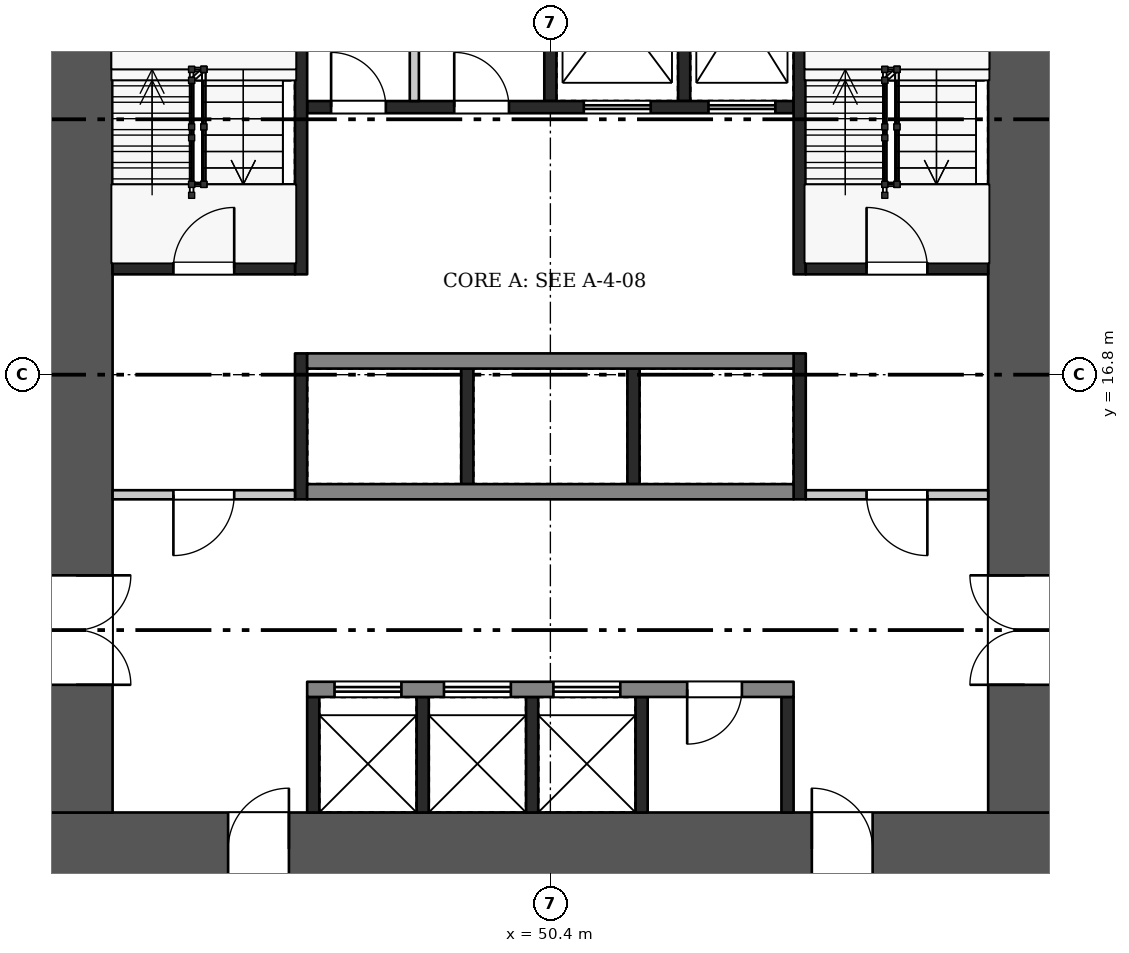
"""IFC4 building model, lengths in metres.
Left out: names, types, materials, properties, quantities, classifications, styles, units other than length and angle.
Written with IfcOpenShell. Run it as: python <this file> out.ifc"""

import sys

from ifc_helpers import new_model, si_unit, direction, frame, frame_2d, origin, place, context, subcontext, project, spatial, rectangle, extrude, element, fill, save


model = new_model("IFC4")
c1 = context("Model", 3, precision=1e-05, world=origin(), true_north=direction((0.0, 1.0)))
c2 = subcontext(c1, "Body", "Model", "MODEL_VIEW")
j1 = project(units=[si_unit("LENGTHUNIT", "METRE"), si_unit("PLANEANGLEUNIT", "RADIAN")], contexts=[c1])
p1 = place(None, origin())
s1 = spatial("IfcSite", under=j1, at=p1, CompositionType="ELEMENT")
p2 = place(p1, origin())
s2 = spatial("IfcBuilding", under=s1, at=p2, CompositionType="ELEMENT")
p3 = place(p2, frame((0.0, 0.0, 19.8)))
s3 = spatial("IfcBuildingStorey", under=s2, at=p3, CompositionType="ELEMENT", Elevation=19.8)
p4 = place(p3, frame((42.0, 9.0, 0.0), z_axis=(0.0, 0.0, 1.0), x_axis=(1.0, 0.0, 0.0)))
e1 = element("IfcWall", 1, at=p4, inside=s3, PredefinedType="SHEAR", context=c2, shape_type="SweptSolid", body=[
    extrude(rectangle(XDim=16.8, YDim=1.2, at=frame_2d((8.4, 0.0))), origin(), (0.0, 0.0, 1.0), 5.12),
])
p5 = place(p4, frame((3.1, 0.0, 0.0)))
e2 = element("IfcOpeningElement", 2, at=p5, cuts=e1, PredefinedType="OPENING", context=c2, shape_type="SweptSolid", body=[
    extrude(rectangle(XDim=1.0, YDim=2.1, at=frame_2d((0.5, 1.05))), frame((0.0, 0.61, 0.0), z_axis=(0.0, -1.0, 0.0), x_axis=(1.0, 0.0, 0.0)), (0.0, 0.0, 1.0), 1.22),
])
p6 = place(p4, frame((12.7, 0.0, 0.0)))
e3 = element("IfcOpeningElement", 3, at=p6, cuts=e1, PredefinedType="OPENING", context=c2, shape_type="SweptSolid", body=[
    extrude(rectangle(XDim=1.0, YDim=2.1, at=frame_2d((0.5, 1.05))), frame((0.0, 0.61, 0.0), z_axis=(0.0, -1.0, 0.0), x_axis=(1.0, 0.0, 0.0)), (0.0, 0.0, 1.0), 1.22),
])
p7 = place(p3, frame((42.6, 9.6, 0.0), z_axis=(0.0, 0.0, 1.0), x_axis=(0.0, 1.0, 0.0)))
e4 = element("IfcWall", 4, at=p7, inside=s3, PredefinedType="SHEAR", context=c2, shape_type="SweptSolid", body=[
    extrude(rectangle(XDim=14.4, YDim=1.2, at=frame_2d((7.2, 0.0))), origin(), (0.0, 0.0, 1.0), 5.12),
])
p8 = place(p7, frame((2.1, 0.0, 0.0)))
e5 = element("IfcOpeningElement", 5, at=p8, cuts=e4, PredefinedType="OPENING", context=c2, shape_type="SweptSolid", body=[
    extrude(rectangle(XDim=1.8, YDim=2.1, at=frame_2d((0.9, 1.05))), frame((0.0, 0.61, 0.0), z_axis=(0.0, -1.0, 0.0), x_axis=(1.0, 0.0, 0.0)), (0.0, 0.0, 1.0), 1.22),
])
p9 = place(p3, frame((58.2, 9.6, 0.0), z_axis=(0.0, 0.0, 1.0), x_axis=(0.0, 1.0, 0.0)))
e6 = element("IfcWall", 6, at=p9, inside=s3, PredefinedType="SHEAR", context=c2, shape_type="SweptSolid", body=[
    extrude(rectangle(XDim=14.4, YDim=1.2, at=frame_2d((7.2, 0.0))), origin(), (0.0, 0.0, 1.0), 5.12),
])
p10 = place(p9, frame((2.1, 0.0, 0.0)))
e7 = element("IfcOpeningElement", 7, at=p10, cuts=e6, PredefinedType="OPENING", context=c2, shape_type="SweptSolid", body=[
    extrude(rectangle(XDim=1.8, YDim=2.1, at=frame_2d((0.9, 1.05))), frame((0.0, 0.61, 0.0), z_axis=(0.0, -1.0, 0.0), x_axis=(1.0, 0.0, 0.0)), (0.0, 0.0, 1.0), 1.22),
])
for number, where, z_axis, x_axis in (
    (8, (46.5, 9.6, 0.0), (0.0, 0.0, 1.0), (0.0, 1.0, 0.0)),
    (9, (48.3, 9.6, 0.0), (0.0, 0.0, 1.0), (0.0, 1.0, 0.0)),
    (10, (50.1, 9.6, 0.0), (0.0, 0.0, 1.0), (0.0, 1.0, 0.0)),
    (11, (51.9, 9.6, 0.0), (0.0, 0.0, 1.0), (0.0, 1.0, 0.0)),
    (12, (54.3, 9.6, 0.0), (0.0, 0.0, 1.0), (0.0, 1.0, 0.0)),
):
    element("IfcWall", number, at=place(p3, frame(where, z_axis=z_axis, x_axis=x_axis)), inside=s3, PredefinedType="SHEAR", context=c2, shape_type="SweptSolid", body=[
        extrude(rectangle(XDim=1.9, YDim=0.2, at=frame_2d((0.95, 0.0))), origin(), (0.0, 0.0, 1.0), 5.12),
    ])
p11 = place(p3, frame((46.4, 11.625, 0.0), z_axis=(0.0, 0.0, 1.0), x_axis=(1.0, 0.0, 0.0)))
e13 = element("IfcWall", 13, at=p11, inside=s3, PredefinedType="SHEAR", context=c2, shape_type="SweptSolid", body=[
    extrude(rectangle(XDim=8.0, YDim=0.25, at=frame_2d((4.0, 0.0))), origin(), (0.0, 0.0, 1.0), 5.12),
])
p12 = place(p11, frame((0.45, 0.0, 0.0)))
e14 = element("IfcOpeningElement", 14, at=p12, cuts=e13, PredefinedType="OPENING", context=c2, shape_type="SweptSolid", body=[
    extrude(rectangle(XDim=1.1, YDim=2.1, at=frame_2d((0.55, 1.05))), frame((0.0, 0.135, 0.0), z_axis=(0.0, -1.0, 0.0), x_axis=(1.0, 0.0, 0.0)), (0.0, 0.0, 1.0), 0.27),
])
p13 = place(p11, frame((2.25, 0.0, 0.0)))
e15 = element("IfcOpeningElement", 15, at=p13, cuts=e13, PredefinedType="OPENING", context=c2, shape_type="SweptSolid", body=[
    extrude(rectangle(XDim=1.1, YDim=2.1, at=frame_2d((0.55, 1.05))), frame((0.0, 0.135, 0.0), z_axis=(0.0, -1.0, 0.0), x_axis=(1.0, 0.0, 0.0)), (0.0, 0.0, 1.0), 0.27),
])
p14 = place(p11, frame((4.05, 0.0, 0.0)))
e16 = element("IfcOpeningElement", 16, at=p14, cuts=e13, PredefinedType="OPENING", context=c2, shape_type="SweptSolid", body=[
    extrude(rectangle(XDim=1.1, YDim=2.1, at=frame_2d((0.55, 1.05))), frame((0.0, 0.135, 0.0), z_axis=(0.0, -1.0, 0.0), x_axis=(1.0, 0.0, 0.0)), (0.0, 0.0, 1.0), 0.27),
])
p15 = place(p11, frame((6.25, 0.0, 0.0)))
e17 = element("IfcOpeningElement", 17, at=p15, cuts=e13, PredefinedType="OPENING", context=c2, shape_type="SweptSolid", body=[
    extrude(rectangle(XDim=0.9, YDim=2.1, at=frame_2d((0.45, 1.05))), frame((0.0, 0.135, 0.0), z_axis=(0.0, -1.0, 0.0), x_axis=(1.0, 0.0, 0.0)), (0.0, 0.0, 1.0), 0.27),
])
for number, where, z_axis, x_axis in (
    (18, (49.033, 15.0, 0.0), (0.0, 0.0, 1.0), (0.0, 1.0, 0.0)),
    (19, (51.767, 15.0, 0.0), (0.0, 0.0, 1.0), (0.0, 1.0, 0.0)),
):
    element("IfcWall", number, at=place(p3, frame(where, z_axis=z_axis, x_axis=x_axis)), inside=s3, PredefinedType="SHEAR", context=c2, shape_type="SweptSolid", body=[
        extrude(rectangle(XDim=1.9, YDim=0.2, at=frame_2d((0.95, 0.0))), origin(), (0.0, 0.0, 1.0), 5.12),
    ])
for number, where, z_axis, x_axis in (
    (20, (46.4, 14.875, 0.0), (0.0, 0.0, 1.0), (1.0, 0.0, 0.0)),
    (21, (46.4, 17.025, 0.0), (0.0, 0.0, 1.0), (1.0, 0.0, 0.0)),
):
    element("IfcWall", number, at=place(p3, frame(where, z_axis=z_axis, x_axis=x_axis)), inside=s3, PredefinedType="SHEAR", context=c2, shape_type="SweptSolid", body=[
        extrude(rectangle(XDim=8.0, YDim=0.25, at=frame_2d((4.0, 0.0))), origin(), (0.0, 0.0, 1.0), 5.12),
    ])
for number, where, z_axis, x_axis in (
    (22, (50.4, 21.3, 0.0), (0.0, 0.0, 1.0), (0.0, 1.0, 0.0)),
    (23, (52.6, 21.3, 0.0), (0.0, 0.0, 1.0), (0.0, 1.0, 0.0)),
):
    element("IfcWall", number, at=place(p3, frame(where, z_axis=z_axis, x_axis=x_axis)), inside=s3, PredefinedType="SHEAR", context=c2, shape_type="SweptSolid", body=[
        extrude(rectangle(XDim=2.7, YDim=0.2, at=frame_2d((1.35, 0.0))), origin(), (0.0, 0.0, 1.0), 5.12),
    ])
p16 = place(p3, frame((48.163, 21.3, 0.0), z_axis=(0.0, 0.0, 1.0), x_axis=(0.0, 1.0, 0.0)))
e24 = element("IfcWall", 24, at=p16, inside=s3, PredefinedType="PARTITIONING", context=c2, shape_type="SweptSolid", body=[
    extrude(rectangle(XDim=2.7, YDim=0.15, at=frame_2d((1.35, 0.0))), origin(), (0.0, 0.0, 1.0), 5.12),
])
p17 = place(p3, frame((46.4, 21.2, 0.0), z_axis=(0.0, 0.0, 1.0), x_axis=(1.0, 0.0, 0.0)))
e25 = element("IfcWall", 25, at=p17, inside=s3, PredefinedType="SHEAR", context=c2, shape_type="SweptSolid", body=[
    extrude(rectangle(XDim=8.0, YDim=0.2, at=frame_2d((4.0, 0.0))), origin(), (0.0, 0.0, 1.0), 5.12),
])
p18 = place(p17, frame((0.394, 0.0, 0.0)))
e26 = element("IfcOpeningElement", 26, at=p18, cuts=e25, PredefinedType="OPENING", context=c2, shape_type="SweptSolid", body=[
    extrude(rectangle(XDim=0.9, YDim=2.1, at=frame_2d((0.45, 1.05))), frame((0.0, 0.11, 0.0), z_axis=(0.0, -1.0, 0.0), x_axis=(1.0, 0.0, 0.0)), (0.0, 0.0, 1.0), 0.22),
])
p19 = place(p17, frame((2.419, 0.0, 0.0)))
e27 = element("IfcOpeningElement", 27, at=p19, cuts=e25, PredefinedType="OPENING", context=c2, shape_type="SweptSolid", body=[
    extrude(rectangle(XDim=0.9, YDim=2.1, at=frame_2d((0.45, 1.05))), frame((0.0, 0.11, 0.0), z_axis=(0.0, -1.0, 0.0), x_axis=(1.0, 0.0, 0.0)), (0.0, 0.0, 1.0), 0.22),
])
p20 = place(p17, frame((4.55, 0.0, 0.0)))
e28 = element("IfcOpeningElement", 28, at=p20, cuts=e25, PredefinedType="OPENING", context=c2, shape_type="SweptSolid", body=[
    extrude(rectangle(XDim=1.1, YDim=2.1, at=frame_2d((0.55, 1.05))), frame((0.0, 0.11, 0.0), z_axis=(0.0, -1.0, 0.0), x_axis=(1.0, 0.0, 0.0)), (0.0, 0.0, 1.0), 0.22),
])
p21 = place(p17, frame((6.6, 0.0, 0.0)))
e29 = element("IfcOpeningElement", 29, at=p21, cuts=e25, PredefinedType="OPENING", context=c2, shape_type="SweptSolid", body=[
    extrude(rectangle(XDim=1.1, YDim=2.1, at=frame_2d((0.55, 1.05))), frame((0.0, 0.11, 0.0), z_axis=(0.0, -1.0, 0.0), x_axis=(1.0, 0.0, 0.0)), (0.0, 0.0, 1.0), 0.22),
])
p22 = place(p3, frame((46.3, 14.75, 0.0), z_axis=(0.0, 0.0, 1.0), x_axis=(0.0, 1.0, 0.0)))
e30 = element("IfcWall", 30, at=p22, inside=s3, PredefinedType="SHEAR", context=c2, shape_type="SweptSolid", body=[
    extrude(rectangle(XDim=2.4, YDim=0.2, at=frame_2d((1.2, 0.0))), origin(), (0.0, 0.0, 1.0), 5.12),
])
p23 = place(p3, frame((46.3, 18.45, 0.0), z_axis=(0.0, 0.0, 1.0), x_axis=(0.0, 1.0, 0.0)))
e31 = element("IfcWall", 31, at=p23, inside=s3, PredefinedType="SHEAR", context=c2, shape_type="SweptSolid", body=[
    extrude(rectangle(XDim=5.55, YDim=0.2, at=frame_2d((2.775, 0.0))), origin(), (0.0, 0.0, 1.0), 5.12),
])
p24 = place(p3, frame((43.2, 14.825, 0.0), z_axis=(0.0, 0.0, 1.0), x_axis=(1.0, 0.0, 0.0)))
e32 = element("IfcWall", 32, at=p24, inside=s3, PredefinedType="PARTITIONING", context=c2, shape_type="SweptSolid", body=[
    extrude(rectangle(XDim=3.0, YDim=0.15, at=frame_2d((1.5, 0.0))), origin(), (0.0, 0.0, 1.0), 5.12),
])
p25 = place(p24, frame((1.0, 0.0, 0.0)))
e33 = element("IfcOpeningElement", 33, at=p25, cuts=e32, PredefinedType="OPENING", context=c2, shape_type="SweptSolid", body=[
    extrude(rectangle(XDim=1.0, YDim=2.1, at=frame_2d((0.5, 1.05))), frame((0.0, 0.085, 0.0), z_axis=(0.0, -1.0, 0.0), x_axis=(1.0, 0.0, 0.0)), (0.0, 0.0, 1.0), 0.17),
])
p26 = place(p3, frame((43.2, 18.55, 0.0), z_axis=(0.0, 0.0, 1.0), x_axis=(1.0, 0.0, 0.0)))
e34 = element("IfcWall", 34, at=p26, inside=s3, PredefinedType="SHEAR", context=c2, shape_type="SweptSolid", body=[
    extrude(rectangle(XDim=3.0, YDim=0.2, at=frame_2d((1.5, 0.0))), origin(), (0.0, 0.0, 1.0), 5.12),
])
p27 = place(p26, frame((1.0, 0.0, 0.0)))
e35 = element("IfcOpeningElement", 35, at=p27, cuts=e34, PredefinedType="OPENING", context=c2, shape_type="SweptSolid", body=[
    extrude(rectangle(XDim=1.0, YDim=2.1, at=frame_2d((0.5, 1.05))), frame((0.0, 0.11, 0.0), z_axis=(0.0, -1.0, 0.0), x_axis=(1.0, 0.0, 0.0)), (0.0, 0.0, 1.0), 0.22),
])
p28 = place(p3, frame((54.5, 14.75, 0.0), z_axis=(0.0, 0.0, 1.0), x_axis=(0.0, 1.0, 0.0)))
e36 = element("IfcWall", 36, at=p28, inside=s3, PredefinedType="SHEAR", context=c2, shape_type="SweptSolid", body=[
    extrude(rectangle(XDim=2.4, YDim=0.2, at=frame_2d((1.2, 0.0))), origin(), (0.0, 0.0, 1.0), 5.12),
])
p29 = place(p3, frame((54.5, 18.45, 0.0), z_axis=(0.0, 0.0, 1.0), x_axis=(0.0, 1.0, 0.0)))
e37 = element("IfcWall", 37, at=p29, inside=s3, PredefinedType="SHEAR", context=c2, shape_type="SweptSolid", body=[
    extrude(rectangle(XDim=5.55, YDim=0.2, at=frame_2d((2.775, 0.0))), origin(), (0.0, 0.0, 1.0), 5.12),
])
p30 = place(p3, frame((54.6, 14.825, 0.0), z_axis=(0.0, 0.0, 1.0), x_axis=(1.0, 0.0, 0.0)))
e38 = element("IfcWall", 38, at=p30, inside=s3, PredefinedType="PARTITIONING", context=c2, shape_type="SweptSolid", body=[
    extrude(rectangle(XDim=3.0, YDim=0.15, at=frame_2d((1.5, 0.0))), origin(), (0.0, 0.0, 1.0), 5.12),
])
p31 = place(p30, frame((1.0, 0.0, 0.0)))
e39 = element("IfcOpeningElement", 39, at=p31, cuts=e38, PredefinedType="OPENING", context=c2, shape_type="SweptSolid", body=[
    extrude(rectangle(XDim=1.0, YDim=2.1, at=frame_2d((0.5, 1.05))), frame((0.0, 0.085, 0.0), z_axis=(0.0, -1.0, 0.0), x_axis=(1.0, 0.0, 0.0)), (0.0, 0.0, 1.0), 0.17),
])
p32 = place(p3, frame((54.6, 18.55, 0.0), z_axis=(0.0, 0.0, 1.0), x_axis=(1.0, 0.0, 0.0)))
e40 = element("IfcWall", 40, at=p32, inside=s3, PredefinedType="SHEAR", context=c2, shape_type="SweptSolid", body=[
    extrude(rectangle(XDim=3.0, YDim=0.2, at=frame_2d((1.5, 0.0))), origin(), (0.0, 0.0, 1.0), 5.12),
])
p33 = place(p32, frame((1.0, 0.0, 0.0)))
e41 = element("IfcOpeningElement", 41, at=p33, cuts=e40, PredefinedType="OPENING", context=c2, shape_type="SweptSolid", body=[
    extrude(rectangle(XDim=1.0, YDim=2.1, at=frame_2d((0.5, 1.05))), frame((0.0, 0.11, 0.0), z_axis=(0.0, -1.0, 0.0), x_axis=(1.0, 0.0, 0.0)), (0.0, 0.0, 1.0), 0.22),
])
p34 = place(p5, origin())
e42 = element("IfcDoor", 42, at=p34, inside=s3, OperationType="SINGLE_SWING_RIGHT", PredefinedType="DOOR", context=c2, shape_type="SweptSolid", body=[
    extrude(rectangle(XDim=1.0, YDim=2.1, at=frame_2d((0.5, 1.05))), frame((0.0, 0.025, 0.0), z_axis=(0.0, -1.0, 0.0), x_axis=(1.0, 0.0, 0.0)), (0.0, 0.0, 1.0), 0.05),
])
fill(e2, e42)
p35 = place(p6, origin())
e43 = element("IfcDoor", 43, at=p35, inside=s3, OperationType="SINGLE_SWING_LEFT", PredefinedType="DOOR", context=c2, shape_type="SweptSolid", body=[
    extrude(rectangle(XDim=1.0, YDim=2.1, at=frame_2d((0.5, 1.05))), frame((0.0, 0.025, 0.0), z_axis=(0.0, -1.0, 0.0), x_axis=(1.0, 0.0, 0.0)), (0.0, 0.0, 1.0), 0.05),
])
fill(e3, e43)
p36 = place(p8, frame((1.8, 0.0, 0.0), z_axis=(0.0, 0.0, 1.0), x_axis=(-1.0, 0.0, 0.0)))
e44 = element("IfcDoor", 44, at=p36, inside=s3, OperationType="DOUBLE_DOOR_SINGLE_SWING", PredefinedType="DOOR", context=c2, shape_type="SweptSolid", body=[
    extrude(rectangle(XDim=1.8, YDim=2.1, at=frame_2d((0.9, 1.05))), frame((0.0, 0.025, 0.0), z_axis=(0.0, -1.0, 0.0), x_axis=(1.0, 0.0, 0.0)), (0.0, 0.0, 1.0), 0.05),
])
fill(e5, e44)
p37 = place(p10, origin())
e45 = element("IfcDoor", 45, at=p37, inside=s3, OperationType="DOUBLE_DOOR_SINGLE_SWING", PredefinedType="DOOR", context=c2, shape_type="SweptSolid", body=[
    extrude(rectangle(XDim=1.8, YDim=2.1, at=frame_2d((0.9, 1.05))), frame((0.0, 0.025, 0.0), z_axis=(0.0, -1.0, 0.0), x_axis=(1.0, 0.0, 0.0)), (0.0, 0.0, 1.0), 0.05),
])
fill(e7, e45)
p38 = place(p12, origin())
e46 = element("IfcDoor", 46, at=p38, inside=s3, OperationType="DOUBLE_DOOR_SLIDING", PredefinedType="DOOR", context=c2, shape_type="SweptSolid", body=[
    extrude(rectangle(XDim=1.1, YDim=2.1, at=frame_2d((0.55, 1.05))), frame((0.0, 0.025, 0.0), z_axis=(0.0, -1.0, 0.0), x_axis=(1.0, 0.0, 0.0)), (0.0, 0.0, 1.0), 0.05),
])
fill(e14, e46)
p39 = place(p13, origin())
e47 = element("IfcDoor", 47, at=p39, inside=s3, OperationType="DOUBLE_DOOR_SLIDING", PredefinedType="DOOR", context=c2, shape_type="SweptSolid", body=[
    extrude(rectangle(XDim=1.1, YDim=2.1, at=frame_2d((0.55, 1.05))), frame((0.0, 0.025, 0.0), z_axis=(0.0, -1.0, 0.0), x_axis=(1.0, 0.0, 0.0)), (0.0, 0.0, 1.0), 0.05),
])
fill(e15, e47)
p40 = place(p14, origin())
e48 = element("IfcDoor", 48, at=p40, inside=s3, OperationType="DOUBLE_DOOR_SLIDING", PredefinedType="DOOR", context=c2, shape_type="SweptSolid", body=[
    extrude(rectangle(XDim=1.1, YDim=2.1, at=frame_2d((0.55, 1.05))), frame((0.0, 0.025, 0.0), z_axis=(0.0, -1.0, 0.0), x_axis=(1.0, 0.0, 0.0)), (0.0, 0.0, 1.0), 0.05),
])
fill(e16, e48)
p41 = place(p15, frame((0.9, 0.0, 0.0), z_axis=(0.0, 0.0, 1.0), x_axis=(-1.0, 0.0, 0.0)))
e49 = element("IfcDoor", 49, at=p41, inside=s3, OperationType="SINGLE_SWING_RIGHT", PredefinedType="DOOR", context=c2, shape_type="SweptSolid", body=[
    extrude(rectangle(XDim=0.9, YDim=2.1, at=frame_2d((0.45, 1.05))), frame((0.0, 0.025, 0.0), z_axis=(0.0, -1.0, 0.0), x_axis=(1.0, 0.0, 0.0)), (0.0, 0.0, 1.0), 0.05),
])
fill(e17, e49)
p42 = place(p18, origin())
e50 = element("IfcDoor", 50, at=p42, inside=s3, OperationType="SINGLE_SWING_LEFT", PredefinedType="DOOR", context=c2, shape_type="SweptSolid", body=[
    extrude(rectangle(XDim=0.9, YDim=2.1, at=frame_2d((0.45, 1.05))), frame((0.0, 0.025, 0.0), z_axis=(0.0, -1.0, 0.0), x_axis=(1.0, 0.0, 0.0)), (0.0, 0.0, 1.0), 0.05),
])
fill(e26, e50)
p43 = place(p19, origin())
e51 = element("IfcDoor", 51, at=p43, inside=s3, OperationType="SINGLE_SWING_LEFT", PredefinedType="DOOR", context=c2, shape_type="SweptSolid", body=[
    extrude(rectangle(XDim=0.9, YDim=2.1, at=frame_2d((0.45, 1.05))), frame((0.0, 0.025, 0.0), z_axis=(0.0, -1.0, 0.0), x_axis=(1.0, 0.0, 0.0)), (0.0, 0.0, 1.0), 0.05),
])
fill(e27, e51)
p44 = place(p20, origin())
e52 = element("IfcDoor", 52, at=p44, inside=s3, OperationType="DOUBLE_DOOR_SLIDING", PredefinedType="DOOR", context=c2, shape_type="SweptSolid", body=[
    extrude(rectangle(XDim=1.1, YDim=2.1, at=frame_2d((0.55, 1.05))), frame((0.0, 0.025, 0.0), z_axis=(0.0, -1.0, 0.0), x_axis=(1.0, 0.0, 0.0)), (0.0, 0.0, 1.0), 0.05),
])
fill(e28, e52)
p45 = place(p21, origin())
e53 = element("IfcDoor", 53, at=p45, inside=s3, OperationType="DOUBLE_DOOR_SLIDING", PredefinedType="DOOR", context=c2, shape_type="SweptSolid", body=[
    extrude(rectangle(XDim=1.1, YDim=2.1, at=frame_2d((0.55, 1.05))), frame((0.0, 0.025, 0.0), z_axis=(0.0, -1.0, 0.0), x_axis=(1.0, 0.0, 0.0)), (0.0, 0.0, 1.0), 0.05),
])
fill(e29, e53)
p46 = place(p25, frame((1.0, 0.0, 0.0), z_axis=(0.0, 0.0, 1.0), x_axis=(-1.0, 0.0, 0.0)))
e54 = element("IfcDoor", 54, at=p46, inside=s3, OperationType="SINGLE_SWING_RIGHT", PredefinedType="DOOR", context=c2, shape_type="SweptSolid", body=[
    extrude(rectangle(XDim=1.0, YDim=2.1, at=frame_2d((0.5, 1.05))), frame((0.0, 0.025, 0.0), z_axis=(0.0, -1.0, 0.0), x_axis=(1.0, 0.0, 0.0)), (0.0, 0.0, 1.0), 0.05),
])
fill(e33, e54)
p47 = place(p27, origin())
e55 = element("IfcDoor", 55, at=p47, inside=s3, OperationType="SINGLE_SWING_RIGHT", PredefinedType="DOOR", context=c2, shape_type="SweptSolid", body=[
    extrude(rectangle(XDim=1.0, YDim=2.1, at=frame_2d((0.5, 1.05))), frame((0.0, 0.025, 0.0), z_axis=(0.0, -1.0, 0.0), x_axis=(1.0, 0.0, 0.0)), (0.0, 0.0, 1.0), 0.05),
])
fill(e35, e55)
p48 = place(p31, frame((1.0, 0.0, 0.0), z_axis=(0.0, 0.0, 1.0), x_axis=(-1.0, 0.0, 0.0)))
e56 = element("IfcDoor", 56, at=p48, inside=s3, OperationType="SINGLE_SWING_LEFT", PredefinedType="DOOR", context=c2, shape_type="SweptSolid", body=[
    extrude(rectangle(XDim=1.0, YDim=2.1, at=frame_2d((0.5, 1.05))), frame((0.0, 0.025, 0.0), z_axis=(0.0, -1.0, 0.0), x_axis=(1.0, 0.0, 0.0)), (0.0, 0.0, 1.0), 0.05),
])
fill(e39, e56)
p49 = place(p33, origin())
e57 = element("IfcDoor", 57, at=p49, inside=s3, OperationType="SINGLE_SWING_LEFT", PredefinedType="DOOR", context=c2, shape_type="SweptSolid", body=[
    extrude(rectangle(XDim=1.0, YDim=2.1, at=frame_2d((0.5, 1.05))), frame((0.0, 0.025, 0.0), z_axis=(0.0, -1.0, 0.0), x_axis=(1.0, 0.0, 0.0)), (0.0, 0.0, 1.0), 0.05),
])
fill(e41, e57)
save(model, sys.argv[1])
